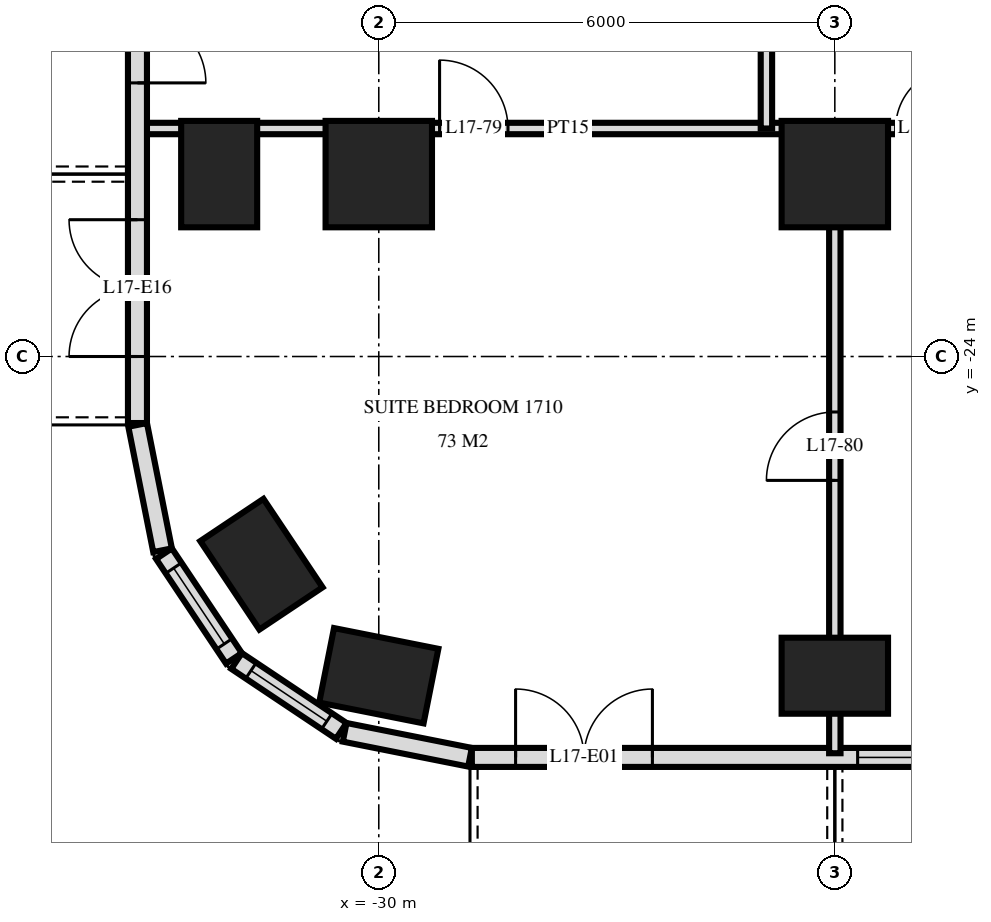
"""IFC4 building model, lengths in metres.
Left out: names, types, materials, properties, quantities, classifications, styles, units other than length and angle.
Written with IfcOpenShell. Run it as: python <this file> out.ifc"""

import sys

from ifc_helpers import new_model, si_unit, direction, frame, frame_2d, origin, origin_2d, place, context, subcontext, project, spatial, rectangle, extrude, element, fill, save


model = new_model("IFC4")
c1 = context("Model", 3, precision=1e-05, world=origin(), true_north=direction((0.0, 1.0)))
c2 = subcontext(c1, "Body", "Model", "MODEL_VIEW")
j1 = project(units=[si_unit("LENGTHUNIT", "METRE"), si_unit("PLANEANGLEUNIT", "RADIAN")], contexts=[c1])
p1 = place(None, origin())
s1 = spatial("IfcSite", under=j1, at=p1, CompositionType="ELEMENT")
p2 = place(p1, origin())
s2 = spatial("IfcBuilding", under=s1, at=p2, CompositionType="ELEMENT")
p3 = place(p2, frame((0.0, 0.0, 70.8)))
s3 = spatial("IfcBuildingStorey", under=s2, at=p3, CompositionType="ELEMENT", Elevation=70.8)
for number, where, z_axis, x_axis in (
    (1, (-32.1, -21.6, 0.0), (0.0, 0.0, 1.0), (0.0, 1.0, 0.0)),
    (2, (-31.544, -26.733, 0.0), (0.0, 0.0, 1.0), (-0.556, 0.831, 0.0)),
    (3, (-30.0, -28.2, 0.0), (0.0, 0.0, 1.0), (-0.981, 0.195, 0.0)),
):
    element("IfcColumn", number, at=place(p3, frame(where, z_axis=z_axis, x_axis=x_axis)), inside=s3, PredefinedType="COLUMN", context=c2, shape_type="SweptSolid", body=[
        extrude(rectangle(XDim=1.4, YDim=1.0, at=origin_2d()), origin(), (0.0, 0.0, 1.0), 3.6),
    ])
p4 = place(p3, frame((-30.0, -21.6, 0.0), z_axis=(0.0, 0.0, 1.0), x_axis=(1.0, 0.0, 0.0)))
e4 = element("IfcColumn", 4, at=p4, inside=s3, PredefinedType="COLUMN", context=c2, shape_type="SweptSolid", body=[
    extrude(rectangle(XDim=1.4, YDim=1.4, at=origin_2d()), origin(), (0.0, 0.0, 1.0), 3.6),
])
p5 = place(p3, frame((-24.0, -28.2, 0.0), z_axis=(0.0, 0.0, 1.0), x_axis=(1.0, 0.0, 0.0)))
e5 = element("IfcColumn", 5, at=p5, inside=s3, PredefinedType="COLUMN", context=c2, shape_type="SweptSolid", body=[
    extrude(rectangle(XDim=1.4, YDim=1.0, at=origin_2d()), origin(), (0.0, 0.0, 1.0), 3.6),
])
p6 = place(p3, frame((-24.0, -21.6, 0.0), z_axis=(0.0, 0.0, 1.0), x_axis=(1.0, 0.0, 0.0)))
e6 = element("IfcColumn", 6, at=p6, inside=s3, PredefinedType="COLUMN", context=c2, shape_type="SweptSolid", body=[
    extrude(rectangle(XDim=1.4, YDim=1.4, at=origin_2d()), origin(), (0.0, 0.0, 1.0), 3.6),
])
p7 = place(p3, frame((-33.175, -3.325, 0.0), z_axis=(0.0, 0.0, 1.0), x_axis=(0.0, -1.0, 0.0)))
e7 = element("IfcWall", 7, at=p7, inside=s3, PredefinedType="SOLIDWALL", context=c2, shape_type="SweptSolid", body=[
    extrude(rectangle(XDim=21.551, YDim=0.25, at=frame_2d((10.775, 0.0))), origin(), (0.0, 0.0, 1.0), 3.32),
])
p8 = place(p7, frame((6.65, 0.0, 0.0)))
e8 = element("IfcOpeningElement", 8, at=p8, cuts=e7, PredefinedType="OPENING", context=c2, shape_type="SweptSolid", body=[
    extrude(rectangle(XDim=1.8, YDim=2.4, at=frame_2d((0.9, 1.2))), frame((0.0, 0.135, 0.0), z_axis=(0.0, -1.0, 0.0), x_axis=(1.0, 0.0, 0.0)), (0.0, 0.0, 1.0), 0.27),
])
p9 = place(p7, frame((12.575, 0.0, 0.3)))
e9 = element("IfcOpeningElement", 9, at=p9, cuts=e7, PredefinedType="OPENING", context=c2, shape_type="SweptSolid", body=[
    extrude(rectangle(XDim=1.2, YDim=2.1, at=frame_2d((0.6, 1.05))), frame((0.0, 0.135, 0.0), z_axis=(0.0, -1.0, 0.0), x_axis=(1.0, 0.0, 0.0)), (0.0, 0.0, 1.0), 0.27),
])
p10 = place(p7, frame((15.275, 0.0, 0.0)))
e10 = element("IfcOpeningElement", 10, at=p10, cuts=e7, PredefinedType="OPENING", context=c2, shape_type="SweptSolid", body=[
    extrude(rectangle(XDim=1.8, YDim=2.4, at=frame_2d((0.9, 1.2))), frame((0.0, 0.135, 0.0), z_axis=(0.0, -1.0, 0.0), x_axis=(1.0, 0.0, 0.0)), (0.0, 0.0, 1.0), 0.27),
])
p11 = place(p7, frame((18.875, 0.0, 0.0)))
e11 = element("IfcOpeningElement", 11, at=p11, cuts=e7, PredefinedType="OPENING", context=c2, shape_type="SweptSolid", body=[
    extrude(rectangle(XDim=1.8, YDim=2.4, at=frame_2d((0.9, 1.2))), frame((0.0, 0.135, 0.0), z_axis=(0.0, -1.0, 0.0), x_axis=(1.0, 0.0, 0.0)), (0.0, 0.0, 1.0), 0.27),
])
p12 = place(p3, frame((-33.173, -24.9, 0.0), z_axis=(0.0, 0.0, 1.0), x_axis=(0.195166572128, -0.980770110232, 0.0)))
e12 = element("IfcWall", 12, at=p12, inside=s3, PredefinedType="SOLIDWALL", context=c2, shape_type="SweptSolid", body=[
    extrude(rectangle(XDim=1.681, YDim=0.25, at=frame_2d((0.841, 0.0))), origin(), (0.0, 0.0, 1.0), 3.32),
])
p13 = place(p3, frame((-32.826, -26.594, 0.0), z_axis=(0.0, 0.0, 1.0), x_axis=(0.55555029066, -0.831482937015, 0.0)))
e13 = element("IfcWall", 13, at=p13, inside=s3, PredefinedType="SOLIDWALL", context=c2, shape_type="SweptSolid", body=[
    extrude(rectangle(XDim=1.656, YDim=0.25, at=frame_2d((0.828, 0.0))), origin(), (0.0, 0.0, 1.0), 3.32),
])
p14 = place(p13, frame((0.228, 0.0, 0.9)))
e14 = element("IfcOpeningElement", 14, at=p14, cuts=e13, PredefinedType="OPENING", context=c2, shape_type="SweptSolid", body=[
    extrude(rectangle(XDim=1.2, YDim=1.5, at=frame_2d((0.6, 0.75))), frame((0.0, 0.135, 0.0), z_axis=(0.0, -1.0, 0.0), x_axis=(1.0, 0.0, 0.0)), (0.0, 0.0, 1.0), 0.27),
])
p15 = place(p3, frame((-31.871, -28.006, 0.0), z_axis=(0.0, 0.0, 1.0), x_axis=(0.831482937015, -0.55555029066, 0.0)))
e15 = element("IfcWall", 15, at=p15, inside=s3, PredefinedType="SOLIDWALL", context=c2, shape_type="SweptSolid", body=[
    extrude(rectangle(XDim=1.656, YDim=0.25, at=frame_2d((0.828, 0.0))), origin(), (0.0, 0.0, 1.0), 3.32),
])
p16 = place(p15, frame((0.228, 0.0, 0.9)))
e16 = element("IfcOpeningElement", 16, at=p16, cuts=e15, PredefinedType="OPENING", context=c2, shape_type="SweptSolid", body=[
    extrude(rectangle(XDim=1.2, YDim=1.5, at=frame_2d((0.6, 0.75))), frame((0.0, 0.135, 0.0), z_axis=(0.0, -1.0, 0.0), x_axis=(1.0, 0.0, 0.0)), (0.0, 0.0, 1.0), 0.27),
])
p17 = place(p3, frame((-30.449, -28.945, 0.0), z_axis=(0.0, 0.0, 1.0), x_axis=(0.980775640221, -0.19513878023, 0.0)))
e17 = element("IfcWall", 17, at=p17, inside=s3, PredefinedType="SOLIDWALL", context=c2, shape_type="SweptSolid", body=[
    extrude(rectangle(XDim=1.681, YDim=0.25, at=frame_2d((0.841, 0.0))), origin(), (0.0, 0.0, 1.0), 3.32),
])
p18 = place(p3, frame((-28.775, -29.275, 0.0), z_axis=(0.0, 0.0, 1.0), x_axis=(1.0, 0.0, 0.0)))
e18 = element("IfcWall", 18, at=p18, inside=s3, PredefinedType="SOLIDWALL", context=c2, shape_type="SweptSolid", body=[
    extrude(rectangle(XDim=57.551, YDim=0.25, at=frame_2d((28.775, 0.0))), origin(), (0.0, 0.0, 1.0), 3.32),
])
p19 = place(p18, frame((0.575, 0.0, 0.0)))
e19 = element("IfcOpeningElement", 19, at=p19, cuts=e18, PredefinedType="OPENING", context=c2, shape_type="SweptSolid", body=[
    extrude(rectangle(XDim=1.8, YDim=2.4, at=frame_2d((0.9, 1.2))), frame((0.0, 0.135, 0.0), z_axis=(0.0, -1.0, 0.0), x_axis=(1.0, 0.0, 0.0)), (0.0, 0.0, 1.0), 0.27),
])
p20 = place(p18, frame((5.075, 0.0, 0.3)))
e20 = element("IfcOpeningElement", 20, at=p20, cuts=e18, PredefinedType="OPENING", context=c2, shape_type="SweptSolid", body=[
    extrude(rectangle(XDim=2.4, YDim=2.1, at=frame_2d((1.2, 1.05))), frame((0.0, 0.135, 0.0), z_axis=(0.0, -1.0, 0.0), x_axis=(1.0, 0.0, 0.0)), (0.0, 0.0, 1.0), 0.27),
])
p21 = place(p18, frame((8.375, 0.0, 0.0)))
e21 = element("IfcOpeningElement", 21, at=p21, cuts=e18, PredefinedType="OPENING", context=c2, shape_type="SweptSolid", body=[
    extrude(rectangle(XDim=1.8, YDim=2.4, at=frame_2d((0.9, 1.2))), frame((0.0, 0.135, 0.0), z_axis=(0.0, -1.0, 0.0), x_axis=(1.0, 0.0, 0.0)), (0.0, 0.0, 1.0), 0.27),
])
p22 = place(p18, frame((11.375, 0.0, 0.0)))
e22 = element("IfcOpeningElement", 22, at=p22, cuts=e18, PredefinedType="OPENING", context=c2, shape_type="SweptSolid", body=[
    extrude(rectangle(XDim=1.8, YDim=2.4, at=frame_2d((0.9, 1.2))), frame((0.0, 0.135, 0.0), z_axis=(0.0, -1.0, 0.0), x_axis=(1.0, 0.0, 0.0)), (0.0, 0.0, 1.0), 0.27),
])
p23 = place(p18, frame((14.075, 0.0, 0.3)))
e23 = element("IfcOpeningElement", 23, at=p23, cuts=e18, PredefinedType="OPENING", context=c2, shape_type="SweptSolid", body=[
    extrude(rectangle(XDim=2.4, YDim=2.1, at=frame_2d((1.2, 1.05))), frame((0.0, 0.135, 0.0), z_axis=(0.0, -1.0, 0.0), x_axis=(1.0, 0.0, 0.0)), (0.0, 0.0, 1.0), 0.27),
])
p24 = place(p18, frame((17.375, 0.0, 0.0)))
e24 = element("IfcOpeningElement", 24, at=p24, cuts=e18, PredefinedType="OPENING", context=c2, shape_type="SweptSolid", body=[
    extrude(rectangle(XDim=1.8, YDim=2.4, at=frame_2d((0.9, 1.2))), frame((0.0, 0.135, 0.0), z_axis=(0.0, -1.0, 0.0), x_axis=(1.0, 0.0, 0.0)), (0.0, 0.0, 1.0), 0.27),
])
p25 = place(p18, frame((20.075, 0.0, 0.3)))
e25 = element("IfcOpeningElement", 25, at=p25, cuts=e18, PredefinedType="OPENING", context=c2, shape_type="SweptSolid", body=[
    extrude(rectangle(XDim=2.4, YDim=2.1, at=frame_2d((1.2, 1.05))), frame((0.0, 0.135, 0.0), z_axis=(0.0, -1.0, 0.0), x_axis=(1.0, 0.0, 0.0)), (0.0, 0.0, 1.0), 0.27),
])
p26 = place(p18, frame((23.075, 0.0, 0.3)))
e26 = element("IfcOpeningElement", 26, at=p26, cuts=e18, PredefinedType="OPENING", context=c2, shape_type="SweptSolid", body=[
    extrude(rectangle(XDim=2.4, YDim=2.1, at=frame_2d((1.2, 1.05))), frame((0.0, 0.135, 0.0), z_axis=(0.0, -1.0, 0.0), x_axis=(1.0, 0.0, 0.0)), (0.0, 0.0, 1.0), 0.27),
])
p27 = place(p18, frame((26.375, 0.0, 0.0)))
e27 = element("IfcOpeningElement", 27, at=p27, cuts=e18, PredefinedType="OPENING", context=c2, shape_type="SweptSolid", body=[
    extrude(rectangle(XDim=1.8, YDim=2.4, at=frame_2d((0.9, 1.2))), frame((0.0, 0.135, 0.0), z_axis=(0.0, -1.0, 0.0), x_axis=(1.0, 0.0, 0.0)), (0.0, 0.0, 1.0), 0.27),
])
p28 = place(p18, frame((29.375, 0.0, 0.0)))
e28 = element("IfcOpeningElement", 28, at=p28, cuts=e18, PredefinedType="OPENING", context=c2, shape_type="SweptSolid", body=[
    extrude(rectangle(XDim=1.8, YDim=2.4, at=frame_2d((0.9, 1.2))), frame((0.0, 0.135, 0.0), z_axis=(0.0, -1.0, 0.0), x_axis=(1.0, 0.0, 0.0)), (0.0, 0.0, 1.0), 0.27),
])
p29 = place(p18, frame((32.075, 0.0, 0.3)))
e29 = element("IfcOpeningElement", 29, at=p29, cuts=e18, PredefinedType="OPENING", context=c2, shape_type="SweptSolid", body=[
    extrude(rectangle(XDim=2.4, YDim=2.1, at=frame_2d((1.2, 1.05))), frame((0.0, 0.135, 0.0), z_axis=(0.0, -1.0, 0.0), x_axis=(1.0, 0.0, 0.0)), (0.0, 0.0, 1.0), 0.27),
])
p30 = place(p18, frame((35.375, 0.0, 0.0)))
e30 = element("IfcOpeningElement", 30, at=p30, cuts=e18, PredefinedType="OPENING", context=c2, shape_type="SweptSolid", body=[
    extrude(rectangle(XDim=1.8, YDim=2.4, at=frame_2d((0.9, 1.2))), frame((0.0, 0.135, 0.0), z_axis=(0.0, -1.0, 0.0), x_axis=(1.0, 0.0, 0.0)), (0.0, 0.0, 1.0), 0.27),
])
p31 = place(p18, frame((38.075, 0.0, 0.3)))
e31 = element("IfcOpeningElement", 31, at=p31, cuts=e18, PredefinedType="OPENING", context=c2, shape_type="SweptSolid", body=[
    extrude(rectangle(XDim=2.4, YDim=2.1, at=frame_2d((1.2, 1.05))), frame((0.0, 0.135, 0.0), z_axis=(0.0, -1.0, 0.0), x_axis=(1.0, 0.0, 0.0)), (0.0, 0.0, 1.0), 0.27),
])
p32 = place(p18, frame((41.075, 0.0, 0.3)))
e32 = element("IfcOpeningElement", 32, at=p32, cuts=e18, PredefinedType="OPENING", context=c2, shape_type="SweptSolid", body=[
    extrude(rectangle(XDim=2.4, YDim=2.1, at=frame_2d((1.2, 1.05))), frame((0.0, 0.135, 0.0), z_axis=(0.0, -1.0, 0.0), x_axis=(1.0, 0.0, 0.0)), (0.0, 0.0, 1.0), 0.27),
])
p33 = place(p18, frame((44.375, 0.0, 0.0)))
e33 = element("IfcOpeningElement", 33, at=p33, cuts=e18, PredefinedType="OPENING", context=c2, shape_type="SweptSolid", body=[
    extrude(rectangle(XDim=1.8, YDim=2.4, at=frame_2d((0.9, 1.2))), frame((0.0, 0.135, 0.0), z_axis=(0.0, -1.0, 0.0), x_axis=(1.0, 0.0, 0.0)), (0.0, 0.0, 1.0), 0.27),
])
p34 = place(p18, frame((47.075, 0.0, 0.3)))
e34 = element("IfcOpeningElement", 34, at=p34, cuts=e18, PredefinedType="OPENING", context=c2, shape_type="SweptSolid", body=[
    extrude(rectangle(XDim=2.4, YDim=2.1, at=frame_2d((1.2, 1.05))), frame((0.0, 0.135, 0.0), z_axis=(0.0, -1.0, 0.0), x_axis=(1.0, 0.0, 0.0)), (0.0, 0.0, 1.0), 0.27),
])
p35 = place(p18, frame((50.375, 0.0, 0.0)))
e35 = element("IfcOpeningElement", 35, at=p35, cuts=e18, PredefinedType="OPENING", context=c2, shape_type="SweptSolid", body=[
    extrude(rectangle(XDim=1.8, YDim=2.4, at=frame_2d((0.9, 1.2))), frame((0.0, 0.135, 0.0), z_axis=(0.0, -1.0, 0.0), x_axis=(1.0, 0.0, 0.0)), (0.0, 0.0, 1.0), 0.27),
])
p36 = place(p18, frame((53.375, 0.0, 0.0)))
e36 = element("IfcOpeningElement", 36, at=p36, cuts=e18, PredefinedType="OPENING", context=c2, shape_type="SweptSolid", body=[
    extrude(rectangle(XDim=1.8, YDim=2.4, at=frame_2d((0.9, 1.2))), frame((0.0, 0.135, 0.0), z_axis=(0.0, -1.0, 0.0), x_axis=(1.0, 0.0, 0.0)), (0.0, 0.0, 1.0), 0.27),
])
p37 = place(p3, frame((-24.0, -29.22, 0.0), z_axis=(0.0, 0.0, 1.0), x_axis=(0.0, 1.0, 0.0)))
e37 = element("IfcWall", 37, at=p37, inside=s3, PredefinedType="PARTITIONING", context=c2, shape_type="SweptSolid", body=[
    extrude(rectangle(XDim=8.22, YDim=0.15, at=frame_2d((4.11, 0.0))), origin(), (0.0, 0.0, 1.0), 3.32),
])
p38 = place(p37, frame((3.59, 0.0, 0.0)))
e38 = element("IfcOpeningElement", 38, at=p38, cuts=e37, PredefinedType="OPENING", context=c2, shape_type="SweptSolid", body=[
    extrude(rectangle(XDim=0.9, YDim=2.1, at=frame_2d((0.45, 1.05))), frame((0.0, 0.085, 0.0), z_axis=(0.0, -1.0, 0.0), x_axis=(1.0, 0.0, 0.0)), (0.0, 0.0, 1.0), 0.17),
])
p39 = place(p3, frame((-24.9, -21.0, 0.0), z_axis=(0.0, 0.0, 1.0), x_axis=(0.0, 1.0, 0.0)))
e39 = element("IfcWall", 39, at=p39, inside=s3, PredefinedType="PARTITIONING", context=c2, shape_type="SweptSolid", body=[
    extrude(rectangle(XDim=3.0, YDim=0.15, at=frame_2d((1.5, 0.0))), origin(), (0.0, 0.0, 1.0), 3.32),
])
p40 = place(p3, frame((-33.12, -21.0, 0.0), z_axis=(0.0, 0.0, 1.0), x_axis=(1.0, 0.0, 0.0)))
e40 = element("IfcWall", 40, at=p40, inside=s3, PredefinedType="PARTITIONING", context=c2, shape_type="SweptSolid", body=[
    extrude(rectangle(XDim=11.22, YDim=0.15, at=frame_2d((5.61, 0.0))), origin(), (0.0, 0.0, 1.0), 3.32),
])
p41 = place(p40, frame((9.92, 0.0, 0.0)))
e41 = element("IfcOpeningElement", 41, at=p41, cuts=e40, PredefinedType="OPENING", context=c2, shape_type="SweptSolid", body=[
    extrude(rectangle(XDim=0.8, YDim=2.1, at=frame_2d((0.4, 1.05))), frame((0.0, 0.085, 0.0), z_axis=(0.0, -1.0, 0.0), x_axis=(1.0, 0.0, 0.0)), (0.0, 0.0, 1.0), 0.17),
])
p42 = place(p40, frame((3.92, 0.0, 0.0)))
e42 = element("IfcOpeningElement", 42, at=p42, cuts=e40, PredefinedType="OPENING", context=c2, shape_type="SweptSolid", body=[
    extrude(rectangle(XDim=0.9, YDim=2.1, at=frame_2d((0.45, 1.05))), frame((0.0, 0.085, 0.0), z_axis=(0.0, -1.0, 0.0), x_axis=(1.0, 0.0, 0.0)), (0.0, 0.0, 1.0), 0.17),
])
p43 = place(p14, origin())
e43 = element("IfcWindow", 43, at=p43, inside=s3, PartitioningType="SINGLE_PANEL", PredefinedType="WINDOW", context=c2, shape_type="SweptSolid", body=[
    extrude(rectangle(XDim=1.2, YDim=1.5, at=frame_2d((0.6, 0.75))), frame((0.0, 0.03, 0.0), z_axis=(0.0, -1.0, 0.0), x_axis=(1.0, 0.0, 0.0)), (0.0, 0.0, 1.0), 0.06),
])
fill(e14, e43)
p44 = place(p16, origin())
e44 = element("IfcWindow", 44, at=p44, inside=s3, PartitioningType="SINGLE_PANEL", PredefinedType="WINDOW", context=c2, shape_type="SweptSolid", body=[
    extrude(rectangle(XDim=1.2, YDim=1.5, at=frame_2d((0.6, 0.75))), frame((0.0, 0.03, 0.0), z_axis=(0.0, -1.0, 0.0), x_axis=(1.0, 0.0, 0.0)), (0.0, 0.0, 1.0), 0.06),
])
fill(e16, e44)
p45 = place(p19, origin())
e45 = element("IfcDoor", 45, at=p45, inside=s3, OperationType="DOUBLE_DOOR_SINGLE_SWING", PredefinedType="DOOR", context=c2, shape_type="SweptSolid", body=[
    extrude(rectangle(XDim=1.8, YDim=2.4, at=frame_2d((0.9, 1.2))), frame((0.0, 0.025, 0.0), z_axis=(0.0, -1.0, 0.0), x_axis=(1.0, 0.0, 0.0)), (0.0, 0.0, 1.0), 0.05),
])
fill(e19, e45)
p46 = place(p20, origin())
e46 = element("IfcWindow", 46, at=p46, inside=s3, PartitioningType="SINGLE_PANEL", PredefinedType="WINDOW", context=c2, shape_type="SweptSolid", body=[
    extrude(rectangle(XDim=2.4, YDim=2.1, at=frame_2d((1.2, 1.05))), frame((0.0, 0.03, 0.0), z_axis=(0.0, -1.0, 0.0), x_axis=(1.0, 0.0, 0.0)), (0.0, 0.0, 1.0), 0.06),
])
fill(e20, e46)
p47 = place(p10, origin())
e47 = element("IfcDoor", 47, at=p47, inside=s3, OperationType="DOUBLE_DOOR_SINGLE_SWING", PredefinedType="DOOR", context=c2, shape_type="SweptSolid", body=[
    extrude(rectangle(XDim=1.8, YDim=2.4, at=frame_2d((0.9, 1.2))), frame((0.0, 0.025, 0.0), z_axis=(0.0, -1.0, 0.0), x_axis=(1.0, 0.0, 0.0)), (0.0, 0.0, 1.0), 0.05),
])
fill(e10, e47)
p48 = place(p11, frame((0.9, 0.0, 0.0), z_axis=(0.0, 0.0, 1.0), x_axis=(-1.0, 0.0, 0.0)))
e48 = element("IfcDoor", 48, at=p48, inside=s3, OperationType="DOUBLE_DOOR_SINGLE_SWING", PredefinedType="DOOR", context=c2, shape_type="SweptSolid", body=[
    extrude(rectangle(XDim=1.8, YDim=2.4, at=frame_2d((0.0, 1.2))), frame((0.0, -0.025, 0.0), z_axis=(0.0, 1.0, 0.0), x_axis=(-1.0, 0.0, 0.0)), (0.0, 0.0, 1.0), 0.05),
])
fill(e11, e48)
p49 = place(p41, origin())
e49 = element("IfcDoor", 49, at=p49, inside=s3, OperationType="SINGLE_SWING_LEFT", PredefinedType="DOOR", context=c2, shape_type="SweptSolid", body=[
    extrude(rectangle(XDim=0.8, YDim=2.1, at=frame_2d((0.4, 1.05))), frame((0.0, 0.025, 0.0), z_axis=(0.0, -1.0, 0.0), x_axis=(1.0, 0.0, 0.0)), (0.0, 0.0, 1.0), 0.05),
])
fill(e41, e49)
p50 = place(p42, origin())
e50 = element("IfcDoor", 50, at=p50, inside=s3, OperationType="SINGLE_SWING_RIGHT", PredefinedType="DOOR", context=c2, shape_type="SweptSolid", body=[
    extrude(rectangle(XDim=0.9, YDim=2.1, at=frame_2d((0.45, 1.05))), frame((0.0, 0.025, 0.0), z_axis=(0.0, -1.0, 0.0), x_axis=(1.0, 0.0, 0.0)), (0.0, 0.0, 1.0), 0.05),
])
fill(e42, e50)
p51 = place(p38, origin())
e51 = element("IfcDoor", 51, at=p51, inside=s3, OperationType="SINGLE_SWING_RIGHT", PredefinedType="DOOR", context=c2, shape_type="SweptSolid", body=[
    extrude(rectangle(XDim=0.9, YDim=2.1, at=frame_2d((0.45, 1.05))), frame((0.0, 0.025, 0.0), z_axis=(0.0, -1.0, 0.0), x_axis=(1.0, 0.0, 0.0)), (0.0, 0.0, 1.0), 0.05),
])
fill(e38, e51)
save(model, sys.argv[1])
